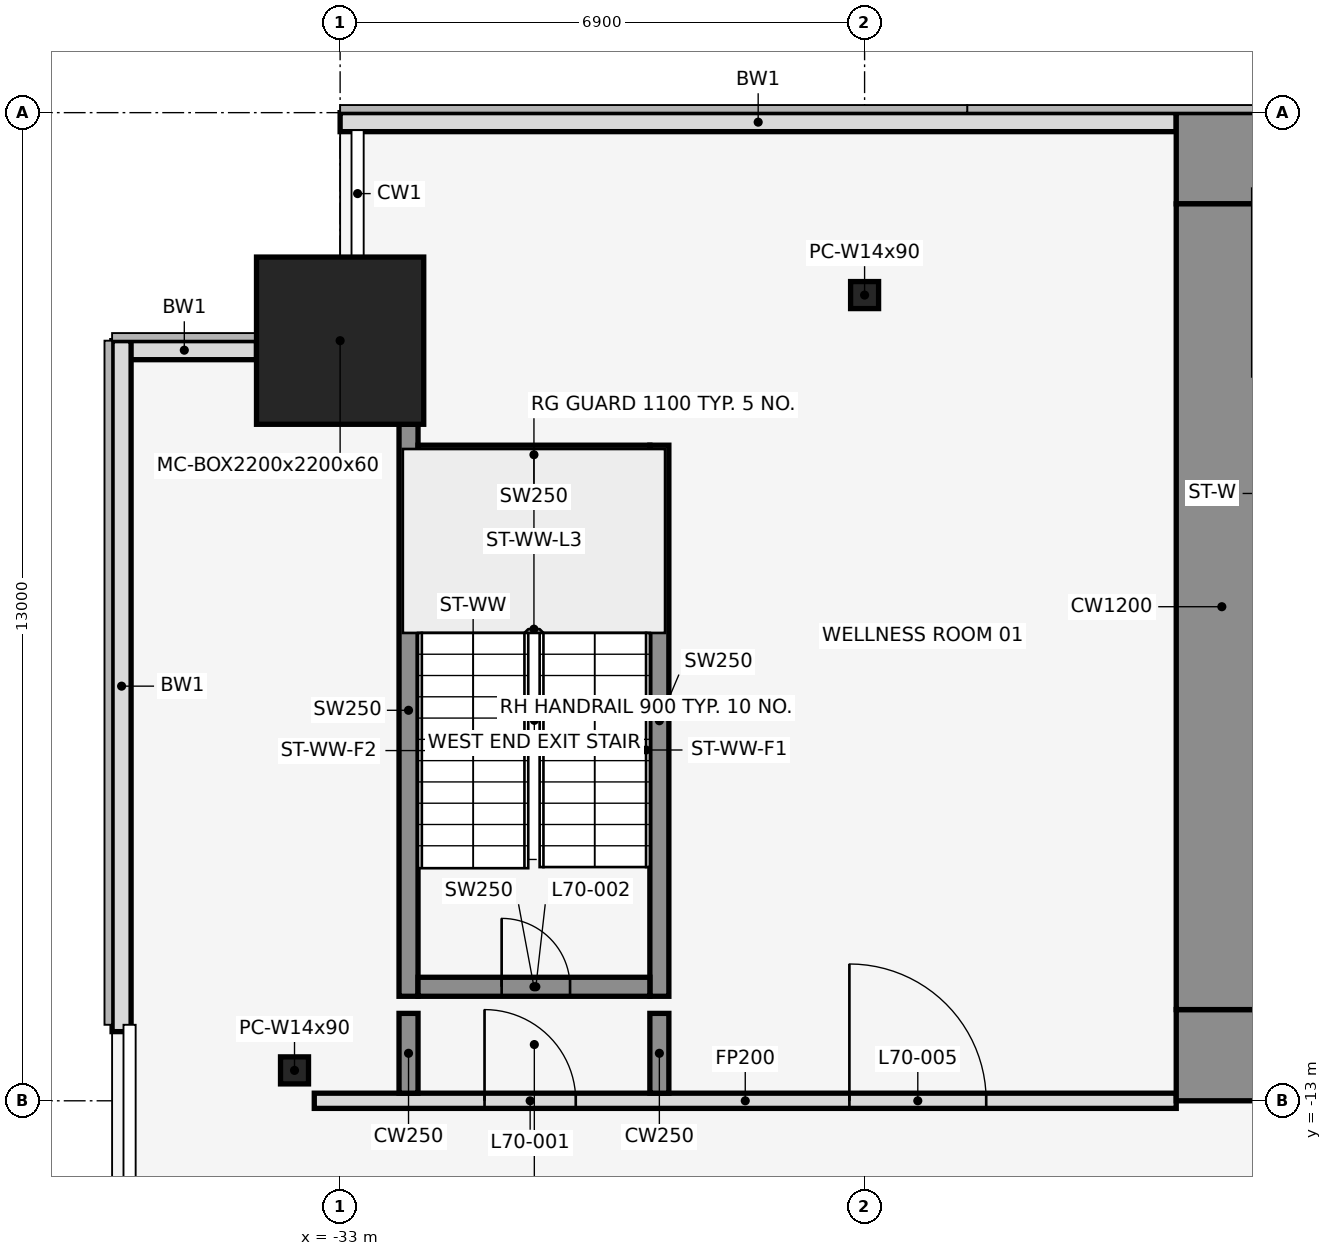
"""IFC4 building model, lengths in metres.
Left out: names, types, materials, properties, quantities, classifications, styles, units other than length and angle.
Written with IfcOpenShell. Run it as: python <this file> out.ifc"""

import sys

from ifc_helpers import new_model, si_unit, direction, frame, frame_2d, origin, origin_2d, place, context, subcontext, project, spatial, rectangle, hollow_rectangle, i_section, extrude, element, fill, save


model = new_model("IFC4")
c1 = context("Model", 3, precision=1e-05, world=origin(), true_north=direction((0.0, 1.0)))
c2 = subcontext(c1, "Body", "Model", "MODEL_VIEW")
j1 = project(units=[si_unit("LENGTHUNIT", "METRE"), si_unit("PLANEANGLEUNIT", "RADIAN")], contexts=[c1])
p1 = place(None, origin())
s1 = spatial("IfcSite", under=j1, at=p1, CompositionType="ELEMENT")
p2 = place(p1, origin())
s2 = spatial("IfcBuilding", under=s1, at=p2, CompositionType="ELEMENT")
p3 = place(p2, frame((0.0, 0.0, 311.0)))
s3 = spatial("IfcBuildingStorey", under=s2, at=p3, CompositionType="ELEMENT", Elevation=311.0)
p4 = place(p3, frame((-33.0, -3.0, 0.0), z_axis=(0.0, 0.0, 1.0), x_axis=(1.0, 0.0, 0.0)))
e1 = element("IfcColumn", 1, at=p4, inside=s3, PredefinedType="COLUMN", context=c2, shape_type="SweptSolid", body=[
    extrude(hollow_rectangle(XDim=2.2, YDim=2.2, WallThickness=0.06, at=origin_2d()), origin(), (0.0, 0.0, 1.0), 4.5),
])
for number, where, z_axis, x_axis in (
    (2, (-26.1, -2.4, 0.0), (0.0, 0.0, 1.0), (1.0, 0.0, 0.0)),
    (3, (-33.6, -12.6, 0.0), (0.0, 0.0, 1.0), (1.0, 0.0, 0.0)),
):
    element("IfcColumn", number, at=place(p3, frame(where, z_axis=z_axis, x_axis=x_axis)), inside=s3, PredefinedType="COLUMN", context=c2, shape_type="SweptSolid", body=[
        extrude(i_section(OverallWidth=0.368, OverallDepth=0.356, WebThickness=0.011, FlangeThickness=0.018, at=origin_2d()), origin(), (0.0, 0.0, 1.0), 4.5),
    ])
p5 = place(p3, frame((-22.0, -0.125, 0.0), z_axis=(0.0, 0.0, 1.0), x_axis=(-1.0, 0.0, 0.0)))
e4 = element("IfcWall", 4, at=p5, inside=s3, PredefinedType="STANDARD", context=c2, shape_type="SweptSolid", body=[
    extrude(rectangle(XDim=11.0, YDim=0.25, at=frame_2d((5.5, 0.0))), origin(), (0.0, 0.0, 1.0), 4.35),
])
p6 = place(p3, frame((-34.1, -3.125, 0.0), z_axis=(0.0, 0.0, 1.0), x_axis=(-1.0, 0.0, 0.0)))
e5 = element("IfcWall", 5, at=p6, inside=s3, PredefinedType="STANDARD", context=c2, shape_type="SweptSolid", body=[
    extrude(rectangle(XDim=1.9, YDim=0.25, at=frame_2d((0.95, 0.0))), origin(), (0.0, 0.0, 1.0), 4.35),
])
p7 = place(p3, frame((-35.875, -3.0, 0.0), z_axis=(0.0, 0.0, 1.0), x_axis=(0.0, -1.0, 0.0)))
e6 = element("IfcWall", 6, at=p7, inside=s3, PredefinedType="STANDARD", context=c2, shape_type="SweptSolid", body=[
    extrude(rectangle(XDim=9.09, YDim=0.25, at=frame_2d((4.545, 0.0))), origin(), (0.0, 0.0, 1.0), 4.35),
])
p8 = place(p3, frame((-32.1, -11.625, 0.0), z_axis=(0.0, 0.0, 1.0), x_axis=(0.0, 1.0, 0.0)))
e7 = element("IfcWall", 7, at=p8, inside=s3, PredefinedType="SHEAR", context=c2, shape_type="SweptSolid", body=[
    extrude(rectangle(XDim=7.525, YDim=0.25, at=frame_2d((3.762, 0.0))), origin(), (0.0, 0.0, 1.0), 4.5),
])
p9 = place(p3, frame((-28.8, -11.625, 0.0), z_axis=(0.0, 0.0, 1.0), x_axis=(0.0, 1.0, 0.0)))
e8 = element("IfcWall", 8, at=p9, inside=s3, PredefinedType="SHEAR", context=c2, shape_type="SweptSolid", body=[
    extrude(rectangle(XDim=7.25, YDim=0.25, at=frame_2d((3.625, 0.0))), origin(), (0.0, 0.0, 1.0), 4.5),
])
p10 = place(p3, frame((-31.975, -11.5, 0.0), z_axis=(0.0, 0.0, 1.0), x_axis=(1.0, 0.0, 0.0)))
e9 = element("IfcWall", 9, at=p10, inside=s3, PredefinedType="SHEAR", context=c2, shape_type="SweptSolid", body=[
    extrude(rectangle(XDim=3.05, YDim=0.25, at=frame_2d((1.525, 0.0))), origin(), (0.0, 0.0, 1.0), 4.5),
])
p11 = place(p10, frame((1.1, 0.0, 0.0)))
e10 = element("IfcOpeningElement", 10, at=p11, cuts=e9, PredefinedType="OPENING", context=c2, shape_type="SweptSolid", body=[
    extrude(rectangle(XDim=0.9, YDim=2.1, at=frame_2d((0.45, 1.05))), frame((0.0, 0.137, 0.0), z_axis=(0.0, -1.0, 0.0), x_axis=(1.0, 0.0, 0.0)), (0.0, 0.0, 1.0), 0.274),
])
p12 = place(p3, frame((-31.975, -4.5, 0.0), z_axis=(0.0, 0.0, 1.0), x_axis=(1.0, 0.0, 0.0)))
e11 = element("IfcWall", 11, at=p12, inside=s3, PredefinedType="SHEAR", context=c2, shape_type="SweptSolid", body=[
    extrude(rectangle(XDim=3.05, YDim=0.25, at=frame_2d((1.525, 0.0))), origin(), (0.0, 0.0, 1.0), 4.5),
])
p13 = place(p3, frame((-33.34, -13.0, 0.0), z_axis=(0.0, 0.0, 1.0), x_axis=(1.0, 0.0, 0.0)))
e12 = element("IfcWall", 12, at=p13, inside=s3, PredefinedType="PARTITIONING", context=c2, shape_type="SweptSolid", body=[
    extrude(rectangle(XDim=11.34, YDim=0.2, at=frame_2d((5.67, 0.0))), origin(), (0.0, 0.0, 1.0), 3.418),
])
p14 = place(p13, frame((2.24, 0.0, 0.0)))
e13 = element("IfcOpeningElement", 13, at=p14, cuts=e12, PredefinedType="OPENING", context=c2, shape_type="SweptSolid", body=[
    extrude(rectangle(XDim=1.2, YDim=2.1, at=frame_2d((0.6, 1.05))), frame((0.0, 0.112, 0.0), z_axis=(0.0, -1.0, 0.0), x_axis=(1.0, 0.0, 0.0)), (0.0, 0.0, 1.0), 0.224),
])
p15 = place(p13, frame((7.04, 0.0, 0.0)))
e14 = element("IfcOpeningElement", 14, at=p15, cuts=e12, PredefinedType="OPENING", context=c2, shape_type="SweptSolid", body=[
    extrude(rectangle(XDim=1.8, YDim=2.1, at=frame_2d((0.9, 1.05))), frame((0.0, 0.112, 0.0), z_axis=(0.0, -1.0, 0.0), x_axis=(1.0, 0.0, 0.0)), (0.0, 0.0, 1.0), 0.224),
])
for number, where, z_axis, x_axis in (
    (15, (-32.1, -12.9, 0.0), (0.0, 0.0, 1.0), (0.0, 1.0, 0.0)),
    (16, (-28.8, -12.9, 0.0), (0.0, 0.0, 1.0), (0.0, 1.0, 0.0)),
):
    element("IfcWall", number, at=place(p3, frame(where, z_axis=z_axis, x_axis=x_axis)), inside=s3, PredefinedType="SHEAR", context=c2, shape_type="SweptSolid", body=[
        extrude(rectangle(XDim=1.05, YDim=0.25, at=frame_2d((0.525, 0.0))), origin(), (0.0, 0.0, 1.0), 4.5),
    ])
p16 = place(p3, frame((-22.0, -0.6, 0.0), z_axis=(0.0, 0.0, 1.0), x_axis=(1.0, 0.0, 0.0)))
e17 = element("IfcWall", 17, at=p16, inside=s3, PredefinedType="SHEAR", context=c2, shape_type="SweptSolid", body=[
    extrude(rectangle(XDim=44.0, YDim=1.2, at=frame_2d((22.0, 0.0))), origin(), (0.0, 0.0, 1.0), 4.5),
])
p17 = place(p16, frame((18.55, 0.0, 0.0)))
e18 = element("IfcOpeningElement", 18, at=p17, cuts=e17, PredefinedType="OPENING", context=c2, shape_type="SweptSolid", body=[
    extrude(rectangle(XDim=0.9, YDim=2.1, at=frame_2d((0.45, 1.05))), frame((0.0, 0.612, 0.0), z_axis=(0.0, -1.0, 0.0), x_axis=(1.0, 0.0, 0.0)), (0.0, 0.0, 1.0), 1.224),
])
p18 = place(p16, frame((24.55, 0.0, 0.0)))
e19 = element("IfcOpeningElement", 19, at=p18, cuts=e17, PredefinedType="OPENING", context=c2, shape_type="SweptSolid", body=[
    extrude(rectangle(XDim=0.9, YDim=2.1, at=frame_2d((0.45, 1.05))), frame((0.0, 0.612, 0.0), z_axis=(0.0, -1.0, 0.0), x_axis=(1.0, 0.0, 0.0)), (0.0, 0.0, 1.0), 1.224),
])
p19 = place(p3, frame((-22.0, -12.4, 0.0), z_axis=(0.0, 0.0, 1.0), x_axis=(1.0, 0.0, 0.0)))
e20 = element("IfcWall", 20, at=p19, inside=s3, PredefinedType="SHEAR", context=c2, shape_type="SweptSolid", body=[
    extrude(rectangle(XDim=44.0, YDim=1.2, at=frame_2d((22.0, 0.0))), origin(), (0.0, 0.0, 1.0), 4.5),
])
p20 = place(p19, frame((2.2, 0.0, 0.0)))
e21 = element("IfcOpeningElement", 21, at=p20, cuts=e20, PredefinedType="OPENING", context=c2, shape_type="SweptSolid", body=[
    extrude(rectangle(XDim=1.2, YDim=2.1, at=frame_2d((0.6, 1.05))), frame((0.0, 0.612, 0.0), z_axis=(0.0, -1.0, 0.0), x_axis=(1.0, 0.0, 0.0)), (0.0, 0.0, 1.0), 1.224),
])
p21 = place(p19, frame((21.4, 0.0, 0.0)))
e22 = element("IfcOpeningElement", 22, at=p21, cuts=e20, PredefinedType="OPENING", context=c2, shape_type="SweptSolid", body=[
    extrude(rectangle(XDim=1.2, YDim=2.1, at=frame_2d((0.6, 1.05))), frame((0.0, 0.612, 0.0), z_axis=(0.0, -1.0, 0.0), x_axis=(1.0, 0.0, 0.0)), (0.0, 0.0, 1.0), 1.224),
])
p22 = place(p19, frame((40.6, 0.0, 0.0)))
e23 = element("IfcOpeningElement", 23, at=p22, cuts=e20, PredefinedType="OPENING", context=c2, shape_type="SweptSolid", body=[
    extrude(rectangle(XDim=1.2, YDim=2.1, at=frame_2d((0.6, 1.05))), frame((0.0, 0.612, 0.0), z_axis=(0.0, -1.0, 0.0), x_axis=(1.0, 0.0, 0.0)), (0.0, 0.0, 1.0), 1.224),
])
p23 = place(p19, frame((16.0, 0.0, 0.0)))
e24 = element("IfcOpeningElement", 24, at=p23, cuts=e20, PredefinedType="OPENING", context=c2, shape_type="SweptSolid", body=[
    extrude(rectangle(XDim=1.8, YDim=2.1, at=frame_2d((0.9, 1.05))), frame((0.0, 0.612, 0.0), z_axis=(0.0, -1.0, 0.0), x_axis=(1.0, 0.0, 0.0)), (0.0, 0.0, 1.0), 1.224),
])
p24 = place(p19, frame((6.3, 0.0, 0.0)))
e25 = element("IfcOpeningElement", 25, at=p24, cuts=e20, PredefinedType="OPENING", context=c2, shape_type="SweptSolid", body=[
    extrude(rectangle(XDim=1.2, YDim=2.1, at=frame_2d((0.6, 1.05))), frame((0.0, 0.612, 0.0), z_axis=(0.0, -1.0, 0.0), x_axis=(1.0, 0.0, 0.0)), (0.0, 0.0, 1.0), 1.224),
])
p25 = place(p19, frame((26.2, 0.0, 0.0)))
e26 = element("IfcOpeningElement", 26, at=p25, cuts=e20, PredefinedType="OPENING", context=c2, shape_type="SweptSolid", body=[
    extrude(rectangle(XDim=1.8, YDim=2.1, at=frame_2d((0.9, 1.05))), frame((0.0, 0.612, 0.0), z_axis=(0.0, -1.0, 0.0), x_axis=(1.0, 0.0, 0.0)), (0.0, 0.0, 1.0), 1.224),
])
p26 = place(p19, frame((36.5, 0.0, 0.0)))
e27 = element("IfcOpeningElement", 27, at=p26, cuts=e20, PredefinedType="OPENING", context=c2, shape_type="SweptSolid", body=[
    extrude(rectangle(XDim=1.2, YDim=2.1, at=frame_2d((0.6, 1.05))), frame((0.0, 0.612, 0.0), z_axis=(0.0, -1.0, 0.0), x_axis=(1.0, 0.0, 0.0)), (0.0, 0.0, 1.0), 1.224),
])
p27 = place(p3, frame((-21.4, -11.8, 0.0), z_axis=(0.0, 0.0, 1.0), x_axis=(0.0, 1.0, 0.0)))
e28 = element("IfcWall", 28, at=p27, inside=s3, PredefinedType="SHEAR", context=c2, shape_type="SweptSolid", body=[
    extrude(rectangle(XDim=10.6, YDim=1.2, at=frame_2d((5.3, 0.0))), origin(), (0.0, 0.0, 1.0), 4.5),
])
p28 = place(p14, origin())
e29 = element("IfcDoor", 29, at=p28, inside=s3, OperationType="SINGLE_SWING_LEFT", PredefinedType="DOOR", context=c2, shape_type="SweptSolid", body=[
    extrude(rectangle(XDim=1.2, YDim=2.1, at=frame_2d((0.6, 1.05))), frame((0.0, 0.025, 0.0), z_axis=(0.0, -1.0, 0.0), x_axis=(1.0, 0.0, 0.0)), (0.0, 0.0, 1.0), 0.05),
])
fill(e13, e29)
p29 = place(p11, origin())
e30 = element("IfcDoor", 30, at=p29, inside=s3, OperationType="SINGLE_SWING_LEFT", PredefinedType="DOOR", context=c2, shape_type="SweptSolid", body=[
    extrude(rectangle(XDim=0.9, YDim=2.1, at=frame_2d((0.45, 1.05))), frame((0.0, 0.025, 0.0), z_axis=(0.0, -1.0, 0.0), x_axis=(1.0, 0.0, 0.0)), (0.0, 0.0, 1.0), 0.05),
])
fill(e10, e30)
p30 = place(p15, origin())
e31 = element("IfcDoor", 31, at=p30, inside=s3, OperationType="SINGLE_SWING_LEFT", PredefinedType="DOOR", context=c2, shape_type="SweptSolid", body=[
    extrude(rectangle(XDim=1.8, YDim=2.1, at=frame_2d((0.9, 1.05))), frame((0.0, 0.025, 0.0), z_axis=(0.0, -1.0, 0.0), x_axis=(1.0, 0.0, 0.0)), (0.0, 0.0, 1.0), 0.05),
])
fill(e14, e31)
save(model, sys.argv[1])
